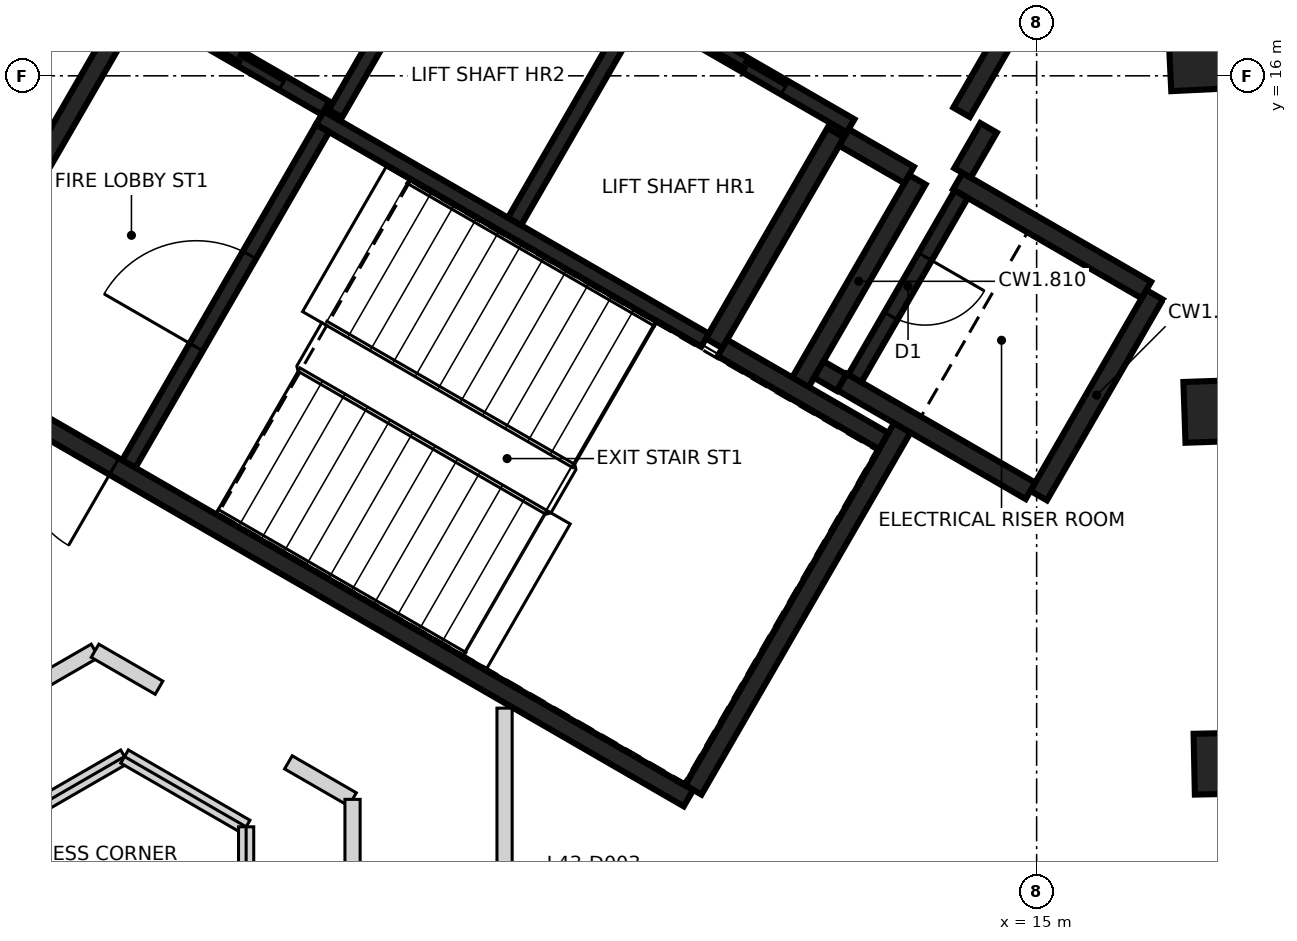
"""IFC4 building model, lengths in metres.
Left out: names, types, materials, properties, quantities, classifications, styles, units other than length and angle.
Written with IfcOpenShell. Run it as: python <this file> out.ifc"""

import sys

from ifc_helpers import new_model, si_unit, direction, frame, frame_2d, origin, origin_2d, place, context, subcontext, project, spatial, rectangle, extrude, element, fill, save


model = new_model("IFC4")
c1 = context("Model", 3, precision=1e-05, world=origin(), true_north=direction((0.0, 1.0)))
c2 = subcontext(c1, "Body", "Model", "MODEL_VIEW")
j1 = project(units=[si_unit("LENGTHUNIT", "METRE"), si_unit("PLANEANGLEUNIT", "RADIAN")], contexts=[c1])
p1 = place(None, origin())
s1 = spatial("IfcSite", under=j1, at=p1, CompositionType="ELEMENT")
p2 = place(p1, origin())
s2 = spatial("IfcBuilding", under=s1, at=p2, CompositionType="ELEMENT")
p3 = place(p2, frame((0.0, 0.0, 175.6)))
s3 = spatial("IfcBuildingStorey", under=s2, at=p3, CompositionType="ELEMENT", Elevation=175.6)
for number, where, z_axis, x_axis in (
    (1, (17.648, 6.956, -0.35), (0.0, 0.0, 1.0), (1.0, 0.021, 0.0)),
    (2, (17.519, 11.592, -0.35), (0.0, 0.0, 1.0), (0.999, 0.034, 0.0)),
    (3, (17.326, 16.226, -0.35), (0.0, 0.0, 1.0), (0.999, 0.048, 0.0)),
):
    element("IfcColumn", number, at=place(p3, frame(where, z_axis=z_axis, x_axis=x_axis)), inside=s3, PredefinedType="COLUMN", context=c2, shape_type="SweptSolid", body=[
        extrude(rectangle(XDim=1.15, YDim=0.8, at=origin_2d()), origin(), (0.0, 0.0, 1.0), 3.6),
    ])
p4 = place(p3, frame((10.42, 6.498, 0.0), z_axis=(0.0, 0.0, 1.0), x_axis=(-0.866021906294, 0.500006057782, 0.0)))
e4 = element("IfcWall", 4, at=p4, inside=s3, PredefinedType="SHEAR", context=c2, shape_type="SweptSolid", body=[
    extrude(rectangle(XDim=11.55, YDim=0.25, at=frame_2d((5.775, 0.0))), origin(), (0.0, 0.0, 1.0), 3.25),
])
p5 = place(p4, frame((10.025, 0.0, 0.0)))
e5 = element("IfcOpeningElement", 5, at=p5, cuts=e4, PredefinedType="OPENING", context=c2, shape_type="SweptSolid", body=[
    extrude(rectangle(XDim=1.2, YDim=2.1, at=frame_2d((0.6, 1.05))), frame((0.0, 0.135, 0.0), z_axis=(0.0, -1.0, 0.0), x_axis=(1.0, 0.0, 0.0)), (0.0, 0.0, 1.0), 0.27),
])
p6 = place(p4, frame((8.725, 0.0, 0.0)))
e6 = element("IfcOpeningElement", 6, at=p6, cuts=e4, PredefinedType="OPENING", context=c2, shape_type="SweptSolid", body=[
    extrude(rectangle(XDim=1.2, YDim=2.1, at=frame_2d((0.6, 1.05))), frame((0.0, 0.135, 0.0), z_axis=(0.0, -1.0, 0.0), x_axis=(1.0, 0.0, 0.0)), (0.0, 0.0, 1.0), 0.27),
])
p7 = place(p3, frame((0.48, 12.381, 0.0), z_axis=(0.0, 0.0, 1.0), x_axis=(0.49999885962, 0.866026062182, 0.0)))
e7 = element("IfcWall", 7, at=p7, inside=s3, PredefinedType="SHEAR", context=c2, shape_type="SweptSolid", body=[
    extrude(rectangle(XDim=5.225, YDim=0.25, at=frame_2d((2.612, 0.0))), origin(), (0.0, 0.0, 1.0), 3.25),
])
p8 = place(p3, frame((13.238, 11.378, 0.0), z_axis=(0.0, 0.0, 1.0), x_axis=(-0.500008851346, -0.866020293397, 0.0)))
e8 = element("IfcWall", 8, at=p8, inside=s3, PredefinedType="SHEAR", context=c2, shape_type="SweptSolid", body=[
    extrude(rectangle(XDim=5.51, YDim=0.25, at=frame_2d((2.755, 0.0))), origin(), (0.0, 0.0, 1.0), 3.25),
])
p9 = place(p3, frame((12.357, 15.252, 0.0), z_axis=(0.0, 0.0, 1.0), x_axis=(-0.500028443584, -0.866008981251, 0.0)))
e9 = element("IfcWall", 9, at=p9, inside=s3, PredefinedType="SHEAR", context=c2, shape_type="SweptSolid", body=[
    extrude(rectangle(XDim=3.2, YDim=0.25, at=frame_2d((1.6, 0.0))), origin(), (0.0, 0.0, 1.0), 3.25),
])
p10 = place(p3, frame((16.552, 13.119, 0.0), z_axis=(0.0, 0.0, 1.0), x_axis=(-0.499978833458, -0.866037623948, 0.0)))
e10 = element("IfcWall", 10, at=p10, inside=s3, PredefinedType="SHEAR", context=c2, shape_type="SweptSolid", body=[
    extrude(rectangle(XDim=3.05, YDim=0.25, at=frame_2d((1.525, 0.0))), origin(), (0.0, 0.0, 1.0), 3.25),
])
p11 = place(p3, frame((14.918, 10.54, 0.0), z_axis=(0.0, 0.0, 1.0), x_axis=(-0.866063538972, 0.499933942099, 0.0)))
e11 = element("IfcWall", 11, at=p11, inside=s3, PredefinedType="SHEAR", context=c2, shape_type="SweptSolid", body=[
    extrude(rectangle(XDim=2.865, YDim=0.25, at=frame_2d((1.432, 0.0))), origin(), (0.0, 0.0, 1.0), 3.25),
])
p12 = place(p3, frame((13.963, 14.614, 0.0), z_axis=(0.0, 0.0, 1.0), x_axis=(0.866042235819, -0.499970844928, 0.0)))
e12 = element("IfcWall", 12, at=p12, inside=s3, PredefinedType="SHEAR", context=c2, shape_type="SweptSolid", body=[
    extrude(rectangle(XDim=2.865, YDim=0.25, at=frame_2d((1.432, 0.0))), origin(), (0.0, 0.0, 1.0), 3.25),
])
p13 = place(p3, frame((11.888, 11.961, 0.0), z_axis=(0.0, 0.0, 1.0), x_axis=(0.500003324108, 0.866023484601, 0.0)))
e13 = element("IfcWall", 13, at=p13, inside=s3, PredefinedType="SHEAR", context=c2, shape_type="SweptSolid", body=[
    extrude(rectangle(XDim=3.085, YDim=0.25, at=frame_2d((1.542, 0.0))), origin(), (0.0, 0.0, 1.0), 3.25),
])
p14 = place(p3, frame((10.865, 12.418, 0.0), z_axis=(0.0, 0.0, 1.0), x_axis=(0.866026229868, -0.499998569178, 0.0)))
e14 = element("IfcWall", 14, at=p14, inside=s3, PredefinedType="SHEAR", context=c2, shape_type="SweptSolid", body=[
    extrude(rectangle(XDim=2.449, YDim=0.25, at=frame_2d((1.225, 0.0))), origin(), (0.0, 0.0, 1.0), 3.25),
])
p15 = place(p3, frame((14.945, 17.135, 0.0), z_axis=(0.0, 0.0, 1.0), x_axis=(-0.499983108224, -0.866035156036, 0.0)))
e15 = element("IfcWall", 15, at=p15, inside=s3, PredefinedType="SHEAR", context=c2, shape_type="SweptSolid", body=[
    extrude(rectangle(XDim=1.865, YDim=0.25, at=frame_2d((0.932, 0.0))), origin(), (0.0, 0.0, 1.0), 3.25),
])
p16 = place(p3, frame((13.322, 14.695, 0.0), z_axis=(0.0, 0.0, 1.0), x_axis=(-0.866017078145, 0.500014420154, 0.0)))
e16 = element("IfcWall", 16, at=p16, inside=s3, PredefinedType="SHEAR", context=c2, shape_type="SweptSolid", body=[
    extrude(rectangle(XDim=0.989, YDim=0.25, at=frame_2d((0.495, 0.0))), origin(), (0.0, 0.0, 1.0), 3.25),
])
p17 = place(p3, frame((14.368, 15.315, 0.0), z_axis=(0.0, 0.0, 1.0), x_axis=(-0.499897359611, -0.866084655132, 0.0)))
e17 = element("IfcWall", 17, at=p17, inside=s3, PredefinedType="SHEAR", context=c2, shape_type="SweptSolid", body=[
    extrude(rectangle(XDim=0.685, YDim=0.25, at=frame_2d((0.342, 0.0))), origin(), (0.0, 0.0, 1.0), 3.25),
])
p18 = place(p3, frame((12.433, 11.964, 0.0), z_axis=(0.0, 0.0, 1.0), x_axis=(-0.866055875208, 0.499947218231, 0.0)))
e18 = element("IfcWall", 18, at=p18, inside=s3, PredefinedType="SHEAR", context=c2, shape_type="SweptSolid", body=[
    extrude(rectangle(XDim=0.345, YDim=0.25, at=frame_2d((0.172, 0.0))), origin(), (0.0, 0.0, 1.0), 3.25),
])
p19 = place(p3, frame((12.552, 15.342, 0.0), z_axis=(0.0, 0.0, 1.0), x_axis=(-0.866030299012, 0.499991521122, 0.0)))
e19 = element("IfcWall", 19, at=p19, inside=s3, PredefinedType="SHEAR", context=c2, shape_type="SweptSolid", body=[
    extrude(rectangle(XDim=6.1, YDim=0.2, at=frame_2d((3.05, 0.0))), origin(), (0.0, 0.0, 1.0), 3.25),
])
p20 = place(p19, frame((1.0, 0.0, 0.0)))
e20 = element("IfcOpeningElement", 20, at=p20, cuts=e19, PredefinedType="OPENING", context=c2, shape_type="SweptSolid", body=[
    extrude(rectangle(XDim=1.2, YDim=2.1, at=frame_2d((0.6, 1.05))), frame((0.0, 0.11, 0.0), z_axis=(0.0, -1.0, 0.0), x_axis=(1.0, 0.0, 0.0)), (0.0, 0.0, 1.0), 0.22),
])
p21 = place(p19, frame((3.982, 0.0, 0.0)))
e21 = element("IfcOpeningElement", 21, at=p21, cuts=e19, PredefinedType="OPENING", context=c2, shape_type="SweptSolid", body=[
    extrude(rectangle(XDim=1.2, YDim=2.1, at=frame_2d((0.6, 1.05))), frame((0.0, 0.11, 0.0), z_axis=(0.0, -1.0, 0.0), x_axis=(1.0, 0.0, 0.0)), (0.0, 0.0, 1.0), 0.22),
])
p22 = place(p3, frame((10.636, 12.521, 0.0), z_axis=(0.0, 0.0, 1.0), x_axis=(-0.866013252188, 0.500021046592, 0.0)))
e22 = element("IfcWall", 22, at=p22, inside=s3, PredefinedType="SHEAR", context=c2, shape_type="SweptSolid", body=[
    extrude(rectangle(XDim=5.851, YDim=0.2, at=frame_2d((2.925, 0.0))), origin(), (0.0, 0.0, 1.0), 3.25),
])
p23 = place(p3, frame((3.057, 10.895, 0.0), z_axis=(0.0, 0.0, 1.0), x_axis=(0.500027839223, 0.866009330205, 0.0)))
e23 = element("IfcWall", 23, at=p23, inside=s3, PredefinedType="SHEAR", context=c2, shape_type="SweptSolid", body=[
    extrude(rectangle(XDim=5.098, YDim=0.2, at=frame_2d((2.549, 0.0))), origin(), (0.0, 0.0, 1.0), 3.25),
])
p24 = place(p23, frame((1.774, 0.0, 0.0)))
e24 = element("IfcOpeningElement", 24, at=p24, cuts=e23, PredefinedType="OPENING", context=c2, shape_type="SweptSolid", body=[
    extrude(rectangle(XDim=1.4, YDim=2.1, at=frame_2d((0.7, 1.05))), frame((0.0, 0.11, 0.0), z_axis=(0.0, -1.0, 0.0), x_axis=(1.0, 0.0, 0.0)), (0.0, 0.0, 1.0), 0.22),
])
p25 = place(p3, frame((8.132, 14.084, 0.0), z_axis=(0.0, 0.0, 1.0), x_axis=(0.500030834389, 0.86600760081, 0.0)))
e25 = element("IfcWall", 25, at=p25, inside=s3, PredefinedType="SHEAR", context=c2, shape_type="SweptSolid", body=[
    extrude(rectangle(XDim=3.198, YDim=0.2, at=frame_2d((1.599, 0.0))), origin(), (0.0, 0.0, 1.0), 3.25),
])
p26 = place(p3, frame((14.008, 14.442, 0.0), z_axis=(0.0, 0.0, 1.0), x_axis=(-0.499986818241, -0.866033014143, 0.0)))
e26 = element("IfcWall", 26, at=p26, inside=s3, PredefinedType="SHEAR", context=c2, shape_type="SweptSolid", body=[
    extrude(rectangle(XDim=2.798, YDim=0.2, at=frame_2d((1.399, 0.0))), origin(), (0.0, 0.0, 1.0), 3.25),
])
p27 = place(p26, frame((0.949, 0.0, 0.0)))
e27 = element("IfcOpeningElement", 27, at=p27, cuts=e26, PredefinedType="OPENING", context=c2, shape_type="SweptSolid", body=[
    extrude(rectangle(XDim=0.9, YDim=2.1, at=frame_2d((0.45, 1.05))), frame((0.0, 0.11, 0.0), z_axis=(0.0, -1.0, 0.0), x_axis=(1.0, 0.0, 0.0)), (0.0, 0.0, 1.0), 0.22),
])
p28 = place(p3, frame((7.324, 18.187, 0.0), z_axis=(0.0, 0.0, 1.0), x_axis=(-0.499967891604, -0.866043940782, 0.0)))
e28 = element("IfcWall", 28, at=p28, inside=s3, PredefinedType="SHEAR", context=c2, shape_type="SweptSolid", body=[
    extrude(rectangle(XDim=3.1, YDim=0.2, at=frame_2d((1.55, 0.0))), origin(), (0.0, 0.0, 1.0), 3.25),
])
p29 = place(p3, frame((5.646, 15.576, 0.0), z_axis=(0.0, 0.0, 1.0), x_axis=(-0.866018407898, 0.500012117035, 0.0)))
e29 = element("IfcWall", 29, at=p29, inside=s3, PredefinedType="SHEAR", context=c2, shape_type="SweptSolid", body=[
    extrude(rectangle(XDim=2.651, YDim=0.2, at=frame_2d((1.325, 0.0))), origin(), (0.0, 0.0, 1.0), 3.25),
])
p30 = place(p29, frame((0.652, 0.0, 0.0)))
e30 = element("IfcOpeningElement", 30, at=p30, cuts=e29, PredefinedType="OPENING", context=c2, shape_type="SweptSolid", body=[
    extrude(rectangle(XDim=1.3, YDim=2.1, at=frame_2d((0.65, 1.05))), frame((0.0, 0.11, 0.0), z_axis=(0.0, -1.0, 0.0), x_axis=(1.0, 0.0, 0.0)), (0.0, 0.0, 1.0), 0.22),
])
p31 = place(p3, frame((-8.612, 1.956, 0.0), z_axis=(0.0, 0.0, 1.0), x_axis=(0.866034386606, 0.499984440973, 0.0)))
e31 = element("IfcWall", 31, at=p31, inside=s3, PredefinedType="PARTITIONING", context=c2, shape_type="SweptSolid", body=[
    extrude(rectangle(XDim=12.96, YDim=0.2, at=frame_2d((6.48, 0.0))), origin(), (0.0, 0.0, 1.0), 3.25),
])
p32 = place(p31, frame((8.105, 0.0, 0.0)))
e32 = element("IfcOpeningElement", 32, at=p32, cuts=e31, PredefinedType="OPENING", context=c2, shape_type="SweptSolid", body=[
    extrude(rectangle(XDim=0.9, YDim=2.1, at=frame_2d((0.45, 1.05))), frame((0.0, 0.11, 0.0), z_axis=(0.0, -1.0, 0.0), x_axis=(1.0, 0.0, 0.0)), (0.0, 0.0, 1.0), 0.22),
])
p33 = place(p31, frame((1.637, 0.0, 0.0)))
e33 = element("IfcOpeningElement", 33, at=p33, cuts=e31, PredefinedType="OPENING", context=c2, shape_type="SweptSolid", body=[
    extrude(rectangle(XDim=0.9, YDim=2.1, at=frame_2d((0.45, 1.05))), frame((0.0, 0.11, 0.0), z_axis=(0.0, -1.0, 0.0), x_axis=(1.0, 0.0, 0.0)), (0.0, 0.0, 1.0), 0.22),
])
p34 = place(p3, frame((-1.035, 12.742, 0.0), z_axis=(0.0, 0.0, 1.0), x_axis=(0.49267817774, 0.870211591039, 0.0)))
e34 = element("IfcWall", 34, at=p34, inside=s3, PredefinedType="PARTITIONING", context=c2, shape_type="SweptSolid", body=[
    extrude(rectangle(XDim=10.427, YDim=0.2, at=frame_2d((5.214, 0.0))), origin(), (0.0, 0.0, 1.0), 3.25),
])
p35 = place(p34, frame((5.568, 0.0, 0.0)))
e35 = element("IfcOpeningElement", 35, at=p35, cuts=e34, PredefinedType="OPENING", context=c2, shape_type="SweptSolid", body=[
    extrude(rectangle(XDim=1.0, YDim=2.1, at=frame_2d((0.5, 1.05))), frame((0.0, 0.11, 0.0), z_axis=(0.0, -1.0, 0.0), x_axis=(1.0, 0.0, 0.0)), (0.0, 0.0, 1.0), 0.22),
])
p36 = place(p3, frame((2.612, 8.436, 0.0), z_axis=(0.0, 0.0, 1.0), x_axis=(0.866055964107, -0.499947064232, 0.0)))
e36 = element("IfcWall", 36, at=p36, inside=s3, PredefinedType="PARTITIONING", context=c2, shape_type="SweptSolid", body=[
    extrude(rectangle(XDim=0.972, YDim=0.2, at=frame_2d((0.486, 0.0))), origin(), (0.0, 0.0, 1.0), 3.25),
])
p37 = place(p3, frame((5.156, 6.968, 0.0), z_axis=(0.0, 0.0, 1.0), x_axis=(0.866123013327, -0.49983089719, 0.0)))
e37 = element("IfcWall", 37, at=p37, inside=s3, PredefinedType="PARTITIONING", context=c2, shape_type="SweptSolid", body=[
    extrude(rectangle(XDim=0.974, YDim=0.2, at=frame_2d((0.487, 0.0))), origin(), (0.0, 0.0, 1.0), 3.25),
])
p38 = place(p3, frame((6.0, -6.481, 0.0), z_axis=(0.0, 0.0, 1.0), x_axis=(0.0, 1.0, 0.0)))
e38 = element("IfcWall", 38, at=p38, inside=s3, PredefinedType="PARTITIONING", context=c2, shape_type="SweptSolid", body=[
    extrude(rectangle(XDim=12.962, YDim=0.2, at=frame_2d((6.481, 0.0))), origin(), (0.0, 0.0, 1.0), 3.25),
])
p39 = place(p38, frame((3.956, 0.0, 0.0)))
e39 = element("IfcOpeningElement", 39, at=p39, cuts=e38, PredefinedType="OPENING", context=c2, shape_type="SweptSolid", body=[
    extrude(rectangle(XDim=0.9, YDim=2.1, at=frame_2d((0.45, 1.05))), frame((0.0, 0.11, 0.0), z_axis=(0.0, -1.0, 0.0), x_axis=(1.0, 0.0, 0.0)), (0.0, 0.0, 1.0), 0.22),
])
p40 = place(p38, frame((10.425, 0.0, 0.0)))
e40 = element("IfcOpeningElement", 40, at=p40, cuts=e38, PredefinedType="OPENING", context=c2, shape_type="SweptSolid", body=[
    extrude(rectangle(XDim=0.9, YDim=2.1, at=frame_2d((0.45, 1.05))), frame((0.0, 0.11, 0.0), z_axis=(0.0, -1.0, 0.0), x_axis=(1.0, 0.0, 0.0)), (0.0, 0.0, 1.0), 0.22),
])
p41 = place(p3, frame((8.0, -5.058, 0.0), z_axis=(0.0, 0.0, 1.0), x_axis=(0.0, 1.0, 0.0)))
e41 = element("IfcWall", 41, at=p41, inside=s3, PredefinedType="PARTITIONING", context=c2, shape_type="SweptSolid", body=[
    extrude(rectangle(XDim=12.74, YDim=0.2, at=frame_2d((6.37, 0.0))), origin(), (0.0, 0.0, 1.0), 3.25),
])
p42 = place(p41, frame((9.508, 0.0, 0.0)))
e42 = element("IfcOpeningElement", 42, at=p42, cuts=e41, PredefinedType="OPENING", context=c2, shape_type="SweptSolid", body=[
    extrude(rectangle(XDim=0.95, YDim=2.1, at=frame_2d((0.475, 1.05))), frame((0.0, 0.11, 0.0), z_axis=(0.0, -1.0, 0.0), x_axis=(1.0, 0.0, 0.0)), (0.0, 0.0, 1.0), 0.22),
])
p43 = place(p3, frame((-7.6, 0.924, 0.0), z_axis=(0.0, 0.0, 1.0), x_axis=(0.866028806638, 0.499994106039, 0.0)))
e43 = element("IfcWall", 43, at=p43, inside=s3, PredefinedType="PARTITIONING", context=c2, shape_type="SweptSolid", body=[
    extrude(rectangle(XDim=12.24, YDim=0.2, at=frame_2d((6.12, 0.0))), origin(), (0.0, 0.0, 1.0), 3.25),
])
p44 = place(p3, frame((3.0, 7.044, 0.0), z_axis=(0.0, 0.0, 1.0), x_axis=(0.865875248522, -0.500259986404, 0.0)))
e44 = element("IfcWall", 44, at=p44, inside=s3, PredefinedType="PARTITIONING", context=c2, shape_type="SweptSolid", body=[
    extrude(rectangle(XDim=1.848, YDim=0.2, at=frame_2d((0.924, 0.0))), origin(), (0.0, 0.0, 1.0), 3.25),
])
p45 = place(p3, frame((4.6, -6.12, 0.0), z_axis=(0.0, 0.0, 1.0), x_axis=(0.0, 1.0, 0.0)))
e45 = element("IfcWall", 45, at=p45, inside=s3, PredefinedType="PARTITIONING", context=c2, shape_type="SweptSolid", body=[
    extrude(rectangle(XDim=12.24, YDim=0.2, at=frame_2d((6.12, 0.0))), origin(), (0.0, 0.0, 1.0), 3.25),
])
p46 = place(p30, origin())
e46 = element("IfcDoor", 46, at=p46, inside=s3, OperationType="SLIDING_TO_RIGHT", PredefinedType="DOOR", context=c2, shape_type="SweptSolid", body=[
    extrude(rectangle(XDim=1.3, YDim=2.1, at=frame_2d((0.65, 1.05))), frame((0.0, 0.025, 0.0), z_axis=(0.0, -1.0, 0.0), x_axis=(1.0, 0.0, 0.0)), (0.0, 0.0, 1.0), 0.05),
])
fill(e30, e46)
p47 = place(p20, origin())
e47 = element("IfcDoor", 47, at=p47, inside=s3, OperationType="DOUBLE_DOOR_SLIDING", PredefinedType="DOOR", context=c2, shape_type="SweptSolid", body=[
    extrude(rectangle(XDim=1.2, YDim=2.1, at=frame_2d((0.6, 1.05))), frame((0.0, 0.025, 0.0), z_axis=(0.0, -1.0, 0.0), x_axis=(1.0, 0.0, 0.0)), (0.0, 0.0, 1.0), 0.05),
])
fill(e20, e47)
p48 = place(p6, origin())
e48 = element("IfcDoor", 48, at=p48, inside=s3, OperationType="SINGLE_SWING_RIGHT", PredefinedType="DOOR", context=c2, shape_type="SweptSolid", body=[
    extrude(rectangle(XDim=1.2, YDim=2.1, at=frame_2d((0.6, 1.05))), frame((0.0, 0.025, 0.0), z_axis=(0.0, -1.0, 0.0), x_axis=(1.0, 0.0, 0.0)), (0.0, 0.0, 1.0), 0.05),
])
fill(e6, e48)
p49 = place(p24, origin())
e49 = element("IfcDoor", 49, at=p49, inside=s3, OperationType="SINGLE_SWING_RIGHT", PredefinedType="DOOR", context=c2, shape_type="SweptSolid", body=[
    extrude(rectangle(XDim=1.4, YDim=2.1, at=frame_2d((0.7, 1.05))), frame((0.0, 0.025, 0.0), z_axis=(0.0, -1.0, 0.0), x_axis=(1.0, 0.0, 0.0)), (0.0, 0.0, 1.0), 0.05),
])
fill(e24, e49)
p50 = place(p27, origin())
e50 = element("IfcDoor", 50, at=p50, inside=s3, OperationType="SINGLE_SWING_LEFT", PredefinedType="DOOR", context=c2, shape_type="SweptSolid", body=[
    extrude(rectangle(XDim=0.9, YDim=2.1, at=frame_2d((0.45, 1.05))), frame((0.0, 0.025, 0.0), z_axis=(0.0, -1.0, 0.0), x_axis=(1.0, 0.0, 0.0)), (0.0, 0.0, 1.0), 0.05),
])
fill(e27, e50)
save(model, sys.argv[1])
